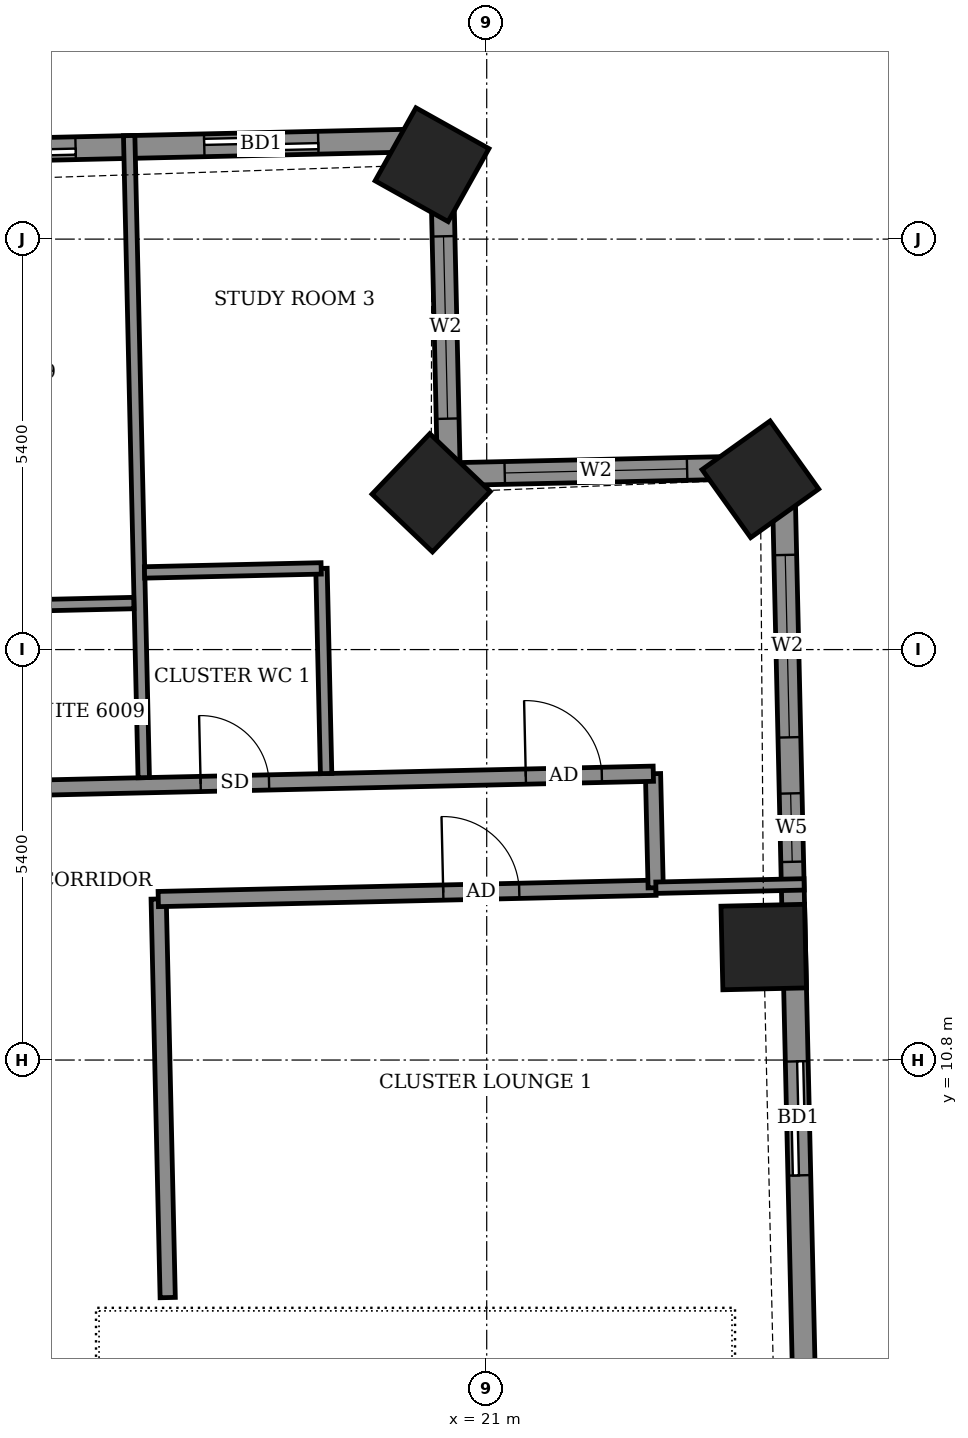
"""IFC4 building model, lengths in metres.
Left out: names, types, materials, properties, quantities, classifications, styles, units other than length and angle.
Written with IfcOpenShell. Run it as: python <this file> out.ifc"""

import sys

from ifc_helpers import new_model, si_unit, direction, frame, frame_2d, origin, origin_2d, place, context, subcontext, project, spatial, rectangle, extrude, element, fill, save


model = new_model("IFC4")
c1 = context("Model", 3, precision=1e-05, world=origin(), true_north=direction((0.0, 1.0)))
c2 = subcontext(c1, "Body", "Model", "MODEL_VIEW")
j1 = project(units=[si_unit("LENGTHUNIT", "METRE"), si_unit("PLANEANGLEUNIT", "RADIAN")], contexts=[c1])
p1 = place(None, origin())
s1 = spatial("IfcSite", under=j1, at=p1, CompositionType="ELEMENT")
p2 = place(p1, origin())
s2 = spatial("IfcBuilding", under=s1, at=p2, CompositionType="ELEMENT")
p3 = place(p2, frame((0.0, 0.0, 238.3)))
s3 = spatial("IfcBuildingStorey", under=s2, at=p3, CompositionType="ELEMENT", Elevation=238.3)
for number, where, z_axis, x_axis in (
    (1, (24.644, 12.287, -0.55), (0.0, 0.0, 1.0), (-0.023, 1.0, 0.0)),
    (2, (24.601, 18.44, -0.55), (0.0, 0.0, 1.0), (-0.581, 0.814, 0.0)),
    (3, (20.269, 18.262, -0.55), (0.0, 0.0, 1.0), (-0.723, 0.691, 0.0)),
    (4, (20.281, 22.579, -0.55), (0.0, 0.0, 1.0), (-0.873, 0.488, 0.0)),
):
    element("IfcColumn", number, at=place(p3, frame(where, z_axis=z_axis, x_axis=x_axis)), inside=s3, PredefinedType="COLUMN", context=c2, shape_type="SweptSolid", body=[
        extrude(rectangle(XDim=1.1, YDim=1.1, at=origin_2d()), origin(), (0.0, 0.0, 1.0), 3.6),
    ])
p4 = place(p3, frame((25.203, 5.31, 0.0), z_axis=(0.0, 0.0, 1.0), x_axis=(-0.022708061432, 0.999742138727, 0.0)))
e5 = element("IfcWall", 5, at=p4, inside=s3, PredefinedType="SOLIDWALL", context=c2, shape_type="SweptSolid", body=[
    extrude(rectangle(XDim=13.299, YDim=0.3, at=frame_2d((6.65, 0.0))), origin(), (0.0, 0.0, 1.0), 2.55),
])
p5 = place(p4, frame((3.974, 0.0, 0.0)))
e6 = element("IfcOpeningElement", 6, at=p5, cuts=e5, PredefinedType="OPENING", context=c2, shape_type="SweptSolid", body=[
    extrude(rectangle(XDim=1.5, YDim=2.4, at=frame_2d((0.75, 1.2))), frame((0.0, 0.16, 0.0), z_axis=(0.0, -1.0, 0.0), x_axis=(1.0, 0.0, 0.0)), (0.0, 0.0, 1.0), 0.32),
])
p6 = place(p4, frame((8.1, 0.0, 0.9)))
e7 = element("IfcOpeningElement", 7, at=p6, cuts=e5, PredefinedType="OPENING", context=c2, shape_type="SweptSolid", body=[
    extrude(rectangle(XDim=0.9, YDim=1.5, at=frame_2d((0.45, 0.75))), frame((0.0, 0.16, 0.0), z_axis=(0.0, -1.0, 0.0), x_axis=(1.0, 0.0, 0.0)), (0.0, 0.0, 1.0), 0.32),
])
p7 = place(p4, frame((9.738, 0.0, 0.9)))
e8 = element("IfcOpeningElement", 8, at=p7, cuts=e5, PredefinedType="OPENING", context=c2, shape_type="SweptSolid", body=[
    extrude(rectangle(XDim=2.4, YDim=1.5, at=frame_2d((1.2, 0.75))), frame((0.0, 0.16, 0.0), z_axis=(0.0, -1.0, 0.0), x_axis=(1.0, 0.0, 0.0)), (0.0, 0.0, 1.0), 0.32),
])
p8 = place(p3, frame((24.901, 18.606, 0.0), z_axis=(0.0, 0.0, 1.0), x_axis=(-0.999747476176, -0.022471846368, 0.0)))
e9 = element("IfcWall", 9, at=p8, inside=s3, PredefinedType="SOLIDWALL", context=c2, shape_type="SweptSolid", body=[
    extrude(rectangle(XDim=4.4, YDim=0.3, at=frame_2d((2.2, 0.0))), origin(), (0.0, 0.0, 1.0), 2.55),
])
p9 = place(p8, frame((1.265, 0.0, 0.9)))
e10 = element("IfcOpeningElement", 10, at=p9, cuts=e9, PredefinedType="OPENING", context=c2, shape_type="SweptSolid", body=[
    extrude(rectangle(XDim=2.4, YDim=1.5, at=frame_2d((1.2, 0.75))), frame((0.0, 0.16, 0.0), z_axis=(0.0, -1.0, 0.0), x_axis=(1.0, 0.0, 0.0)), (0.0, 0.0, 1.0), 0.32),
])
p10 = place(p3, frame((20.502, 18.507, 0.0), z_axis=(0.0, 0.0, 1.0), x_axis=(-0.02247683371, 0.999747364061, 0.0)))
e11 = element("IfcWall", 11, at=p10, inside=s3, PredefinedType="SOLIDWALL", context=c2, shape_type="SweptSolid", body=[
    extrude(rectangle(XDim=4.399, YDim=0.3, at=frame_2d((2.2, 0.0))), origin(), (0.0, 0.0, 1.0), 2.55),
])
p11 = place(p10, frame((0.731, 0.0, 0.9)))
e12 = element("IfcOpeningElement", 12, at=p11, cuts=e11, PredefinedType="OPENING", context=c2, shape_type="SweptSolid", body=[
    extrude(rectangle(XDim=2.4, YDim=1.5, at=frame_2d((1.2, 0.75))), frame((0.0, 0.16, 0.0), z_axis=(0.0, -1.0, 0.0), x_axis=(1.0, 0.0, 0.0)), (0.0, 0.0, 1.0), 0.32),
])
p12 = place(p3, frame((20.403, 22.905, 0.0), z_axis=(0.0, 0.0, 1.0), x_axis=(-0.99974298964, -0.022670568288, 0.0)))
e13 = element("IfcWall", 13, at=p12, inside=s3, PredefinedType="SOLIDWALL", context=c2, shape_type="SweptSolid", body=[
    extrude(rectangle(XDim=44.509, YDim=0.3, at=frame_2d((22.254, 0.0))), origin(), (0.0, 0.0, 1.0), 2.55),
])
p13 = place(p12, frame((1.62, 0.0, 0.0)))
e14 = element("IfcOpeningElement", 14, at=p13, cuts=e13, PredefinedType="OPENING", context=c2, shape_type="SweptSolid", body=[
    extrude(rectangle(XDim=1.5, YDim=2.4, at=frame_2d((0.75, 1.2))), frame((0.0, 0.16, 0.0), z_axis=(0.0, -1.0, 0.0), x_axis=(1.0, 0.0, 0.0)), (0.0, 0.0, 1.0), 0.32),
])
p14 = place(p12, frame((4.813, 0.0, 0.0)))
e15 = element("IfcOpeningElement", 15, at=p14, cuts=e13, PredefinedType="OPENING", context=c2, shape_type="SweptSolid", body=[
    extrude(rectangle(XDim=1.5, YDim=2.4, at=frame_2d((0.75, 1.2))), frame((0.0, 0.16, 0.0), z_axis=(0.0, -1.0, 0.0), x_axis=(1.0, 0.0, 0.0)), (0.0, 0.0, 1.0), 0.32),
])
p15 = place(p12, frame((9.833, 0.0, 0.0)))
e16 = element("IfcOpeningElement", 16, at=p15, cuts=e13, PredefinedType="OPENING", context=c2, shape_type="SweptSolid", body=[
    extrude(rectangle(XDim=1.5, YDim=2.4, at=frame_2d((0.75, 1.2))), frame((0.0, 0.16, 0.0), z_axis=(0.0, -1.0, 0.0), x_axis=(1.0, 0.0, 0.0)), (0.0, 0.0, 1.0), 0.32),
])
p16 = place(p12, frame((15.522, 0.0, 0.0)))
e17 = element("IfcOpeningElement", 17, at=p16, cuts=e13, PredefinedType="OPENING", context=c2, shape_type="SweptSolid", body=[
    extrude(rectangle(XDim=1.2, YDim=2.4, at=frame_2d((0.6, 1.2))), frame((0.0, 0.16, 0.0), z_axis=(0.0, -1.0, 0.0), x_axis=(1.0, 0.0, 0.0)), (0.0, 0.0, 1.0), 0.32),
])
p17 = place(p12, frame((18.558, 0.0, 0.0)))
e18 = element("IfcOpeningElement", 18, at=p17, cuts=e13, PredefinedType="OPENING", context=c2, shape_type="SweptSolid", body=[
    extrude(rectangle(XDim=1.5, YDim=2.4, at=frame_2d((0.75, 1.2))), frame((0.0, 0.16, 0.0), z_axis=(0.0, -1.0, 0.0), x_axis=(1.0, 0.0, 0.0)), (0.0, 0.0, 1.0), 0.32),
])
p18 = place(p12, frame((23.456, 0.0, 0.0)))
e19 = element("IfcOpeningElement", 19, at=p18, cuts=e13, PredefinedType="OPENING", context=c2, shape_type="SweptSolid", body=[
    extrude(rectangle(XDim=1.5, YDim=2.4, at=frame_2d((0.75, 1.2))), frame((0.0, 0.16, 0.0), z_axis=(0.0, -1.0, 0.0), x_axis=(1.0, 0.0, 0.0)), (0.0, 0.0, 1.0), 0.32),
])
p19 = place(p12, frame((26.89, 0.0, 0.0)))
e20 = element("IfcOpeningElement", 20, at=p19, cuts=e13, PredefinedType="OPENING", context=c2, shape_type="SweptSolid", body=[
    extrude(rectangle(XDim=1.5, YDim=2.4, at=frame_2d((0.75, 1.2))), frame((0.0, 0.16, 0.0), z_axis=(0.0, -1.0, 0.0), x_axis=(1.0, 0.0, 0.0)), (0.0, 0.0, 1.0), 0.32),
])
p20 = place(p12, frame((31.708, 0.0, 0.0)))
e21 = element("IfcOpeningElement", 21, at=p20, cuts=e13, PredefinedType="OPENING", context=c2, shape_type="SweptSolid", body=[
    extrude(rectangle(XDim=1.5, YDim=2.4, at=frame_2d((0.75, 1.2))), frame((0.0, 0.16, 0.0), z_axis=(0.0, -1.0, 0.0), x_axis=(1.0, 0.0, 0.0)), (0.0, 0.0, 1.0), 0.32),
])
p21 = place(p12, frame((35.024, 0.0, 0.0)))
e22 = element("IfcOpeningElement", 22, at=p21, cuts=e13, PredefinedType="OPENING", context=c2, shape_type="SweptSolid", body=[
    extrude(rectangle(XDim=1.5, YDim=2.4, at=frame_2d((0.75, 1.2))), frame((0.0, 0.16, 0.0), z_axis=(0.0, -1.0, 0.0), x_axis=(1.0, 0.0, 0.0)), (0.0, 0.0, 1.0), 0.32),
])
p22 = place(p12, frame((40.173, 0.0, 0.9)))
e23 = element("IfcOpeningElement", 23, at=p22, cuts=e13, PredefinedType="OPENING", context=c2, shape_type="SweptSolid", body=[
    extrude(rectangle(XDim=2.4, YDim=1.5, at=frame_2d((1.2, 0.75))), frame((0.0, 0.16, 0.0), z_axis=(0.0, -1.0, 0.0), x_axis=(1.0, 0.0, 0.0)), (0.0, 0.0, 1.0), 0.32),
])
p23 = place(p3, frame((16.803, 7.675, 0.0), z_axis=(0.0, 0.0, 1.0), x_axis=(-0.022667483124, 0.999743059595, 0.0)))
e24 = element("IfcWall", 24, at=p23, inside=s3, PredefinedType="PARTITIONING", context=c2, shape_type="SweptSolid", body=[
    extrude(rectangle(XDim=5.245, YDim=0.2, at=frame_2d((2.623, 0.0))), origin(), (0.0, 0.0, 1.0), 3.05),
])
p24 = place(p3, frame((16.679, 12.918, 0.0), z_axis=(0.0, 0.0, 1.0), x_axis=(0.99974139269, 0.022740882632, 0.0)))
e25 = element("IfcWall", 25, at=p24, inside=s3, PredefinedType="PARTITIONING", context=c2, shape_type="SweptSolid", body=[
    extrude(rectangle(XDim=6.549, YDim=0.2, at=frame_2d((3.274, 0.0))), origin(), (0.0, 0.0, 1.0), 3.05),
])
p25 = place(p24, frame((3.75, 0.0, 0.0)))
e26 = element("IfcOpeningElement", 26, at=p25, cuts=e25, PredefinedType="OPENING", context=c2, shape_type="SweptSolid", body=[
    extrude(rectangle(XDim=1.0, YDim=2.1, at=frame_2d((0.5, 1.05))), frame((0.0, 0.11, 0.0), z_axis=(0.0, -1.0, 0.0), x_axis=(1.0, 0.0, 0.0)), (0.0, 0.0, 1.0), 0.22),
])
p26 = place(p3, frame((23.223, 13.067, 0.0), z_axis=(0.0, 0.0, 1.0), x_axis=(-0.023268438023, 0.999729253244, 0.0)))
e27 = element("IfcWall", 27, at=p26, inside=s3, PredefinedType="PARTITIONING", context=c2, shape_type="SweptSolid", body=[
    extrude(rectangle(XDim=1.5, YDim=0.2, at=frame_2d((0.75, 0.0))), origin(), (0.0, 0.0, 1.0), 3.05),
])
p27 = place(p3, frame((23.226, 13.067, 0.0), z_axis=(0.0, 0.0, 1.0), x_axis=(0.999743319694, 0.022656008622, 0.0)))
e28 = element("IfcWall", 28, at=p27, inside=s3, PredefinedType="PARTITIONING", context=c2, shape_type="SweptSolid", body=[
    extrude(rectangle(XDim=1.95, YDim=0.15, at=frame_2d((0.975, 0.0))), origin(), (0.0, 0.0, 1.0), 2.55),
])
p28 = place(p3, frame((-27.652, 13.413, 0.0), z_axis=(0.0, 0.0, 1.0), x_axis=(0.999742610679, 0.022687273792, 0.0)))
e29 = element("IfcWall", 29, at=p28, inside=s3, PredefinedType="PARTITIONING", context=c2, shape_type="SweptSolid", body=[
    extrude(rectangle(XDim=50.857, YDim=0.2, at=frame_2d((25.429, 0.0))), origin(), (0.0, 0.0, 1.0), 3.05),
])
p29 = place(p28, frame((49.179, 0.0, 0.0)))
e30 = element("IfcOpeningElement", 30, at=p29, cuts=e29, PredefinedType="OPENING", context=c2, shape_type="SweptSolid", body=[
    extrude(rectangle(XDim=1.0, YDim=2.1, at=frame_2d((0.5, 1.05))), frame((0.0, 0.11, 0.0), z_axis=(0.0, -1.0, 0.0), x_axis=(1.0, 0.0, 0.0)), (0.0, 0.0, 1.0), 0.22),
])
p30 = place(p28, frame((44.9, 0.0, 0.0)))
e31 = element("IfcOpeningElement", 31, at=p30, cuts=e29, PredefinedType="OPENING", context=c2, shape_type="SweptSolid", body=[
    extrude(rectangle(XDim=0.9, YDim=2.1, at=frame_2d((0.45, 1.05))), frame((0.0, 0.11, 0.0), z_axis=(0.0, -1.0, 0.0), x_axis=(1.0, 0.0, 0.0)), (0.0, 0.0, 1.0), 0.22),
])
p31 = place(p28, frame((40.375, 0.0, 0.0)))
e32 = element("IfcOpeningElement", 32, at=p31, cuts=e29, PredefinedType="OPENING", context=c2, shape_type="SweptSolid", body=[
    extrude(rectangle(XDim=0.9, YDim=2.1, at=frame_2d((0.45, 1.05))), frame((0.0, 0.11, 0.0), z_axis=(0.0, -1.0, 0.0), x_axis=(1.0, 0.0, 0.0)), (0.0, 0.0, 1.0), 0.22),
])
p32 = place(p28, frame((38.425, 0.0, 0.0)))
e33 = element("IfcOpeningElement", 33, at=p32, cuts=e29, PredefinedType="OPENING", context=c2, shape_type="SweptSolid", body=[
    extrude(rectangle(XDim=0.9, YDim=2.1, at=frame_2d((0.45, 1.05))), frame((0.0, 0.11, 0.0), z_axis=(0.0, -1.0, 0.0), x_axis=(1.0, 0.0, 0.0)), (0.0, 0.0, 1.0), 0.22),
])
p33 = place(p28, frame((31.625, 0.0, 0.0)))
e34 = element("IfcOpeningElement", 34, at=p33, cuts=e29, PredefinedType="OPENING", context=c2, shape_type="SweptSolid", body=[
    extrude(rectangle(XDim=0.9, YDim=2.1, at=frame_2d((0.45, 1.05))), frame((0.0, 0.11, 0.0), z_axis=(0.0, -1.0, 0.0), x_axis=(1.0, 0.0, 0.0)), (0.0, 0.0, 1.0), 0.22),
])
p34 = place(p28, frame((29.7, 0.0, 0.0)))
e35 = element("IfcOpeningElement", 35, at=p34, cuts=e29, PredefinedType="OPENING", context=c2, shape_type="SweptSolid", body=[
    extrude(rectangle(XDim=0.9, YDim=2.1, at=frame_2d((0.45, 1.05))), frame((0.0, 0.11, 0.0), z_axis=(0.0, -1.0, 0.0), x_axis=(1.0, 0.0, 0.0)), (0.0, 0.0, 1.0), 0.22),
])
p35 = place(p28, frame((22.95, 0.0, 0.0)))
e36 = element("IfcOpeningElement", 36, at=p35, cuts=e29, PredefinedType="OPENING", context=c2, shape_type="SweptSolid", body=[
    extrude(rectangle(XDim=0.9, YDim=2.1, at=frame_2d((0.45, 1.05))), frame((0.0, 0.11, 0.0), z_axis=(0.0, -1.0, 0.0), x_axis=(1.0, 0.0, 0.0)), (0.0, 0.0, 1.0), 0.22),
])
p36 = place(p28, frame((20.95, 0.0, 0.0)))
e37 = element("IfcOpeningElement", 37, at=p36, cuts=e29, PredefinedType="OPENING", context=c2, shape_type="SweptSolid", body=[
    extrude(rectangle(XDim=0.9, YDim=2.1, at=frame_2d((0.45, 1.05))), frame((0.0, 0.11, 0.0), z_axis=(0.0, -1.0, 0.0), x_axis=(1.0, 0.0, 0.0)), (0.0, 0.0, 1.0), 0.22),
])
p37 = place(p28, frame((14.15, 0.0, 0.0)))
e38 = element("IfcOpeningElement", 38, at=p37, cuts=e29, PredefinedType="OPENING", context=c2, shape_type="SweptSolid", body=[
    extrude(rectangle(XDim=0.9, YDim=2.1, at=frame_2d((0.45, 1.05))), frame((0.0, 0.11, 0.0), z_axis=(0.0, -1.0, 0.0), x_axis=(1.0, 0.0, 0.0)), (0.0, 0.0, 1.0), 0.22),
])
p38 = place(p28, frame((12.2, 0.0, 0.0)))
e39 = element("IfcOpeningElement", 39, at=p38, cuts=e29, PredefinedType="OPENING", context=c2, shape_type="SweptSolid", body=[
    extrude(rectangle(XDim=0.9, YDim=2.1, at=frame_2d((0.45, 1.05))), frame((0.0, 0.11, 0.0), z_axis=(0.0, -1.0, 0.0), x_axis=(1.0, 0.0, 0.0)), (0.0, 0.0, 1.0), 0.22),
])
p39 = place(p28, frame((2.05, 0.0, 0.0)))
e40 = element("IfcOpeningElement", 40, at=p39, cuts=e29, PredefinedType="OPENING", context=c2, shape_type="SweptSolid", body=[
    extrude(rectangle(XDim=1.0, YDim=2.1, at=frame_2d((0.5, 1.05))), frame((0.0, 0.11, 0.0), z_axis=(0.0, -1.0, 0.0), x_axis=(1.0, 0.0, 0.0)), (0.0, 0.0, 1.0), 0.22),
])
p40 = place(p28, frame((7.45, 0.0, 0.0)))
e41 = element("IfcOpeningElement", 41, at=p40, cuts=e29, PredefinedType="OPENING", context=c2, shape_type="SweptSolid", body=[
    extrude(rectangle(XDim=0.9, YDim=2.1, at=frame_2d((0.45, 1.05))), frame((0.0, 0.11, 0.0), z_axis=(0.0, -1.0, 0.0), x_axis=(1.0, 0.0, 0.0)), (0.0, 0.0, 1.0), 0.22),
])
p41 = place(p3, frame((16.488, 14.515, 0.0), z_axis=(0.0, 0.0, 1.0), x_axis=(-0.022740440012, 0.999741402758, 0.0)))
e42 = element("IfcWall", 42, at=p41, inside=s3, PredefinedType="PARTITIONING", context=c2, shape_type="SweptSolid", body=[
    extrude(rectangle(XDim=8.449, YDim=0.15, at=frame_2d((4.225, 0.0))), origin(), (0.0, 0.0, 1.0), 2.55),
])
p42 = place(p3, frame((18.887, 14.569, 0.0), z_axis=(0.0, 0.0, 1.0), x_axis=(-0.02260842146, 0.999744396973, 0.0)))
e43 = element("IfcWall", 43, at=p42, inside=s3, PredefinedType="PARTITIONING", context=c2, shape_type="SweptSolid", body=[
    extrude(rectangle(XDim=2.7, YDim=0.15, at=frame_2d((1.35, 0.0))), origin(), (0.0, 0.0, 1.0), 3.05),
])
p43 = place(p3, frame((14.032, 16.759, 0.0), z_axis=(0.0, 0.0, 1.0), x_axis=(0.999740478815, 0.022781023197, 0.0)))
e44 = element("IfcWall", 44, at=p43, inside=s3, PredefinedType="PARTITIONING", context=c2, shape_type="SweptSolid", body=[
    extrude(rectangle(XDim=2.325, YDim=0.15, at=frame_2d((1.163, 0.0))), origin(), (0.0, 0.0, 1.0), 3.05),
])
p44 = place(p3, frame((16.498, 17.215, 0.0), z_axis=(0.0, 0.0, 1.0), x_axis=(0.999740260747, 0.02279059109, 0.0)))
e45 = element("IfcWall", 45, at=p44, inside=s3, PredefinedType="PARTITIONING", context=c2, shape_type="SweptSolid", body=[
    extrude(rectangle(XDim=2.324, YDim=0.15, at=frame_2d((1.162, 0.0))), origin(), (0.0, 0.0, 1.0), 3.05),
])
p45 = place(p5, origin())
e46 = element("IfcDoor", 46, at=p45, inside=s3, OperationType="SLIDING_TO_LEFT", PredefinedType="DOOR", context=c2, shape_type="SweptSolid", body=[
    extrude(rectangle(XDim=1.5, YDim=2.4, at=frame_2d((0.75, 1.2))), frame((0.0, 0.025, 0.0), z_axis=(0.0, -1.0, 0.0), x_axis=(1.0, 0.0, 0.0)), (0.0, 0.0, 1.0), 0.05),
])
fill(e6, e46)
p46 = place(p6, origin())
e47 = element("IfcWindow", 47, at=p46, inside=s3, PartitioningType="SINGLE_PANEL", PredefinedType="WINDOW", context=c2, shape_type="SweptSolid", body=[
    extrude(rectangle(XDim=0.9, YDim=1.5, at=frame_2d((0.45, 0.75))), frame((0.0, 0.03, 0.0), z_axis=(0.0, -1.0, 0.0), x_axis=(1.0, 0.0, 0.0)), (0.0, 0.0, 1.0), 0.06),
])
fill(e7, e47)
p47 = place(p7, origin())
e48 = element("IfcWindow", 48, at=p47, inside=s3, PartitioningType="DOUBLE_PANEL_VERTICAL", PredefinedType="WINDOW", context=c2, shape_type="SweptSolid", body=[
    extrude(rectangle(XDim=2.4, YDim=1.5, at=frame_2d((1.2, 0.75))), frame((0.0, 0.03, 0.0), z_axis=(0.0, -1.0, 0.0), x_axis=(1.0, 0.0, 0.0)), (0.0, 0.0, 1.0), 0.06),
])
fill(e8, e48)
p48 = place(p9, origin())
e49 = element("IfcWindow", 49, at=p48, inside=s3, PartitioningType="DOUBLE_PANEL_VERTICAL", PredefinedType="WINDOW", context=c2, shape_type="SweptSolid", body=[
    extrude(rectangle(XDim=2.4, YDim=1.5, at=frame_2d((1.2, 0.75))), frame((0.0, 0.03, 0.0), z_axis=(0.0, -1.0, 0.0), x_axis=(1.0, 0.0, 0.0)), (0.0, 0.0, 1.0), 0.06),
])
fill(e10, e49)
p49 = place(p11, origin())
e50 = element("IfcWindow", 50, at=p49, inside=s3, PartitioningType="DOUBLE_PANEL_VERTICAL", PredefinedType="WINDOW", context=c2, shape_type="SweptSolid", body=[
    extrude(rectangle(XDim=2.4, YDim=1.5, at=frame_2d((1.2, 0.75))), frame((0.0, 0.03, 0.0), z_axis=(0.0, -1.0, 0.0), x_axis=(1.0, 0.0, 0.0)), (0.0, 0.0, 1.0), 0.06),
])
fill(e12, e50)
p50 = place(p13, origin())
e51 = element("IfcDoor", 51, at=p50, inside=s3, OperationType="SLIDING_TO_LEFT", PredefinedType="DOOR", context=c2, shape_type="SweptSolid", body=[
    extrude(rectangle(XDim=1.5, YDim=2.4, at=frame_2d((0.75, 1.2))), frame((0.0, 0.025, 0.0), z_axis=(0.0, -1.0, 0.0), x_axis=(1.0, 0.0, 0.0)), (0.0, 0.0, 1.0), 0.05),
])
fill(e14, e51)
p51 = place(p14, origin())
e52 = element("IfcDoor", 52, at=p51, inside=s3, OperationType="SLIDING_TO_LEFT", PredefinedType="DOOR", context=c2, shape_type="SweptSolid", body=[
    extrude(rectangle(XDim=1.5, YDim=2.4, at=frame_2d((0.75, 1.2))), frame((0.0, 0.025, 0.0), z_axis=(0.0, -1.0, 0.0), x_axis=(1.0, 0.0, 0.0)), (0.0, 0.0, 1.0), 0.05),
])
fill(e15, e52)
p52 = place(p25, origin())
e53 = element("IfcDoor", 53, at=p52, inside=s3, OperationType="SINGLE_SWING_RIGHT", PredefinedType="DOOR", context=c2, shape_type="SweptSolid", body=[
    extrude(rectangle(XDim=1.0, YDim=2.1, at=frame_2d((0.5, 1.05))), frame((0.0, 0.025, 0.0), z_axis=(0.0, -1.0, 0.0), x_axis=(1.0, 0.0, 0.0)), (0.0, 0.0, 1.0), 0.05),
])
fill(e26, e53)
p53 = place(p29, origin())
e54 = element("IfcDoor", 54, at=p53, inside=s3, OperationType="SINGLE_SWING_LEFT", PredefinedType="DOOR", context=c2, shape_type="SweptSolid", body=[
    extrude(rectangle(XDim=1.0, YDim=2.1, at=frame_2d((0.5, 1.05))), frame((0.0, 0.025, 0.0), z_axis=(0.0, -1.0, 0.0), x_axis=(1.0, 0.0, 0.0)), (0.0, 0.0, 1.0), 0.05),
])
fill(e30, e54)
p54 = place(p30, origin())
e55 = element("IfcDoor", 55, at=p54, inside=s3, OperationType="SINGLE_SWING_RIGHT", PredefinedType="DOOR", context=c2, shape_type="SweptSolid", body=[
    extrude(rectangle(XDim=0.9, YDim=2.1, at=frame_2d((0.45, 1.05))), frame((0.0, 0.025, 0.0), z_axis=(0.0, -1.0, 0.0), x_axis=(1.0, 0.0, 0.0)), (0.0, 0.0, 1.0), 0.05),
])
fill(e31, e55)
save(model, sys.argv[1])
